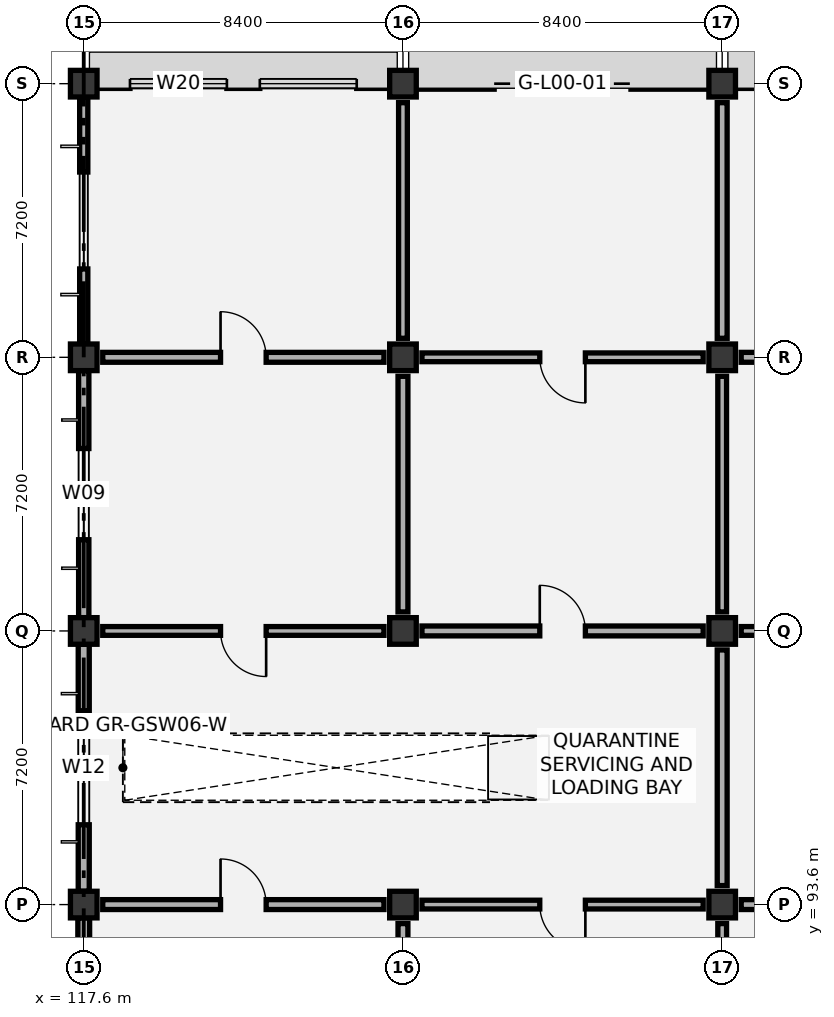
"""IFC4 building model, lengths in metres.
Left out: names, types, materials, properties, quantities, classifications, styles, units other than length and angle.
Written with IfcOpenShell. Run it as: python <this file> out.ifc"""

import sys

from ifc_helpers import new_model, si_unit, direction, frame, frame_2d, origin, origin_2d, place, context, subcontext, project, spatial, rectangle, extrude, element, fill, save


model = new_model("IFC4")
c1 = context("Model", 3, precision=1e-05, world=origin(), true_north=direction((0.0, 1.0)))
c2 = subcontext(c1, "Body", "Model", "MODEL_VIEW")
j1 = project(units=[si_unit("LENGTHUNIT", "METRE"), si_unit("PLANEANGLEUNIT", "RADIAN")], contexts=[c1])
p1 = place(None, origin())
s1 = spatial("IfcSite", under=j1, at=p1, CompositionType="ELEMENT")
p2 = place(p1, origin())
s2 = spatial("IfcBuilding", under=s1, at=p2, CompositionType="ELEMENT")
p3 = place(p2, origin())
s3 = spatial("IfcBuildingStorey", under=s2, at=p3, CompositionType="ELEMENT", Elevation=0.0)
for number, where, z_axis, x_axis in (
    (1, (117.6, 93.6, 0.0), (0.0, 0.0, 1.0), (1.0, 0.0, 0.0)),
    (2, (117.6, 100.8, 0.0), (0.0, 0.0, 1.0), (1.0, 0.0, 0.0)),
    (3, (117.6, 108.0, 0.0), (0.0, 0.0, 1.0), (1.0, 0.0, 0.0)),
    (4, (117.6, 115.2, 0.0), (0.0, 0.0, 1.0), (1.0, 0.0, 0.0)),
    (5, (126.0, 93.6, 0.0), (0.0, 0.0, 1.0), (1.0, 0.0, 0.0)),
    (6, (126.0, 100.8, 0.0), (0.0, 0.0, 1.0), (1.0, 0.0, 0.0)),
    (7, (126.0, 108.0, 0.0), (0.0, 0.0, 1.0), (1.0, 0.0, 0.0)),
    (8, (126.0, 115.2, 0.0), (0.0, 0.0, 1.0), (1.0, 0.0, 0.0)),
    (9, (134.4, 93.6, 0.0), (0.0, 0.0, 1.0), (1.0, 0.0, 0.0)),
    (10, (134.4, 100.8, 0.0), (0.0, 0.0, 1.0), (1.0, 0.0, 0.0)),
    (11, (134.4, 108.0, 0.0), (0.0, 0.0, 1.0), (1.0, 0.0, 0.0)),
    (12, (134.4, 115.2, 0.0), (0.0, 0.0, 1.0), (1.0, 0.0, 0.0)),
):
    element("IfcColumn", number, at=place(p3, frame(where, z_axis=z_axis, x_axis=x_axis)), inside=s3, PredefinedType="COLUMN", context=c2, shape_type="SweptSolid", body=[
        extrude(rectangle(XDim=0.7, YDim=0.7, at=origin_2d()), origin(), (0.0, 0.0, 1.0), 6.0),
    ])
p4 = place(p3, frame((117.6, 86.75, 0.0), z_axis=(0.0, 0.0, 1.0), x_axis=(0.0, 1.0, 0.0)))
e13 = element("IfcWall", 13, at=p4, inside=s3, PredefinedType="SOLIDWALL", context=c2, shape_type="SweptSolid", body=[
    extrude(rectangle(XDim=6.5, YDim=0.31, at=frame_2d((3.25, 0.0))), origin(), (0.0, 0.0, 1.0), 5.02),
])
p5 = place(p4, frame((1.75, 0.0, 0.9)))
e14 = element("IfcOpeningElement", 14, at=p5, cuts=e13, PredefinedType="OPENING", context=c2, shape_type="SweptSolid", body=[
    extrude(rectangle(XDim=3.0, YDim=2.1, at=frame_2d((1.5, 1.05))), frame((0.0, 0.165, 0.0), z_axis=(0.0, -1.0, 0.0), x_axis=(1.0, 0.0, 0.0)), (0.0, 0.0, 1.0), 0.33),
])
p6 = place(p3, frame((117.6, 93.95, 0.0), z_axis=(0.0, 0.0, 1.0), x_axis=(0.0, 1.0, 0.0)))
e15 = element("IfcWall", 15, at=p6, inside=s3, PredefinedType="SOLIDWALL", context=c2, shape_type="SweptSolid", body=[
    extrude(rectangle(XDim=6.5, YDim=0.29, at=frame_2d((3.25, 0.0))), origin(), (0.0, 0.0, 1.0), 5.12),
])
p7 = place(p6, frame((1.75, 0.0, 0.9)))
e16 = element("IfcOpeningElement", 16, at=p7, cuts=e15, PredefinedType="OPENING", context=c2, shape_type="SweptSolid", body=[
    extrude(rectangle(XDim=3.0, YDim=2.4, at=frame_2d((1.5, 1.2))), frame((0.0, 0.155, 0.0), z_axis=(0.0, -1.0, 0.0), x_axis=(1.0, 0.0, 0.0)), (0.0, 0.0, 1.0), 0.31),
])
p8 = place(p3, frame((117.6, 101.15, 0.0), z_axis=(0.0, 0.0, 1.0), x_axis=(0.0, 1.0, 0.0)))
e17 = element("IfcWall", 17, at=p8, inside=s3, PredefinedType="SOLIDWALL", context=c2, shape_type="SweptSolid", body=[
    extrude(rectangle(XDim=6.5, YDim=0.27, at=frame_2d((3.25, 0.0))), origin(), (0.0, 0.0, 1.0), 5.12),
])
p9 = place(p8, frame((2.05, 0.0, 0.9)))
e18 = element("IfcOpeningElement", 18, at=p9, cuts=e17, PredefinedType="OPENING", context=c2, shape_type="SweptSolid", body=[
    extrude(rectangle(XDim=2.4, YDim=2.1, at=frame_2d((1.2, 1.05))), frame((0.0, 0.145, 0.0), z_axis=(0.0, -1.0, 0.0), x_axis=(1.0, 0.0, 0.0)), (0.0, 0.0, 1.0), 0.29),
])
p10 = place(p3, frame((117.95, 115.2, 0.0), z_axis=(0.0, 0.0, 1.0), x_axis=(1.0, 0.0, 0.0)))
e19 = element("IfcWall", 19, at=p10, inside=s3, PredefinedType="SOLIDWALL", context=c2, shape_type="SweptSolid", body=[
    extrude(rectangle(XDim=7.7, YDim=0.25, at=frame_2d((3.85, 0.0))), origin(), (0.0, 0.0, 1.0), 5.12),
])
p11 = place(p10, frame((0.867, 0.0, 0.9)))
e20 = element("IfcOpeningElement", 20, at=p11, cuts=e19, PredefinedType="OPENING", context=c2, shape_type="SweptSolid", body=[
    extrude(rectangle(XDim=2.55, YDim=1.95, at=frame_2d((1.275, 0.975))), frame((0.0, 0.135, 0.0), z_axis=(0.0, -1.0, 0.0), x_axis=(1.0, 0.0, 0.0)), (0.0, 0.0, 1.0), 0.27),
])
p12 = place(p10, frame((4.283, 0.0, 0.9)))
e21 = element("IfcOpeningElement", 21, at=p12, cuts=e19, PredefinedType="OPENING", context=c2, shape_type="SweptSolid", body=[
    extrude(rectangle(XDim=2.55, YDim=1.95, at=frame_2d((1.275, 0.975))), frame((0.0, 0.135, 0.0), z_axis=(0.0, -1.0, 0.0), x_axis=(1.0, 0.0, 0.0)), (0.0, 0.0, 1.0), 0.27),
])
p13 = place(p3, frame((117.6, 108.35, 0.0), z_axis=(0.0, 0.0, 1.0), x_axis=(0.0, 1.0, 0.0)))
e22 = element("IfcWall", 22, at=p13, inside=s3, PredefinedType="SOLIDWALL", context=c2, shape_type="SweptSolid", body=[
    extrude(rectangle(XDim=6.5, YDim=0.215, at=frame_2d((3.25, 0.0))), origin(), (0.0, 0.0, 1.0), 5.12),
])
p14 = place(p13, frame((1.975, 0.0, 0.9)))
e23 = element("IfcOpeningElement", 23, at=p14, cuts=e22, PredefinedType="OPENING", context=c2, shape_type="SweptSolid", body=[
    extrude(rectangle(XDim=2.55, YDim=1.95, at=frame_2d((1.275, 0.975))), frame((0.0, 0.117, 0.0), z_axis=(0.0, -1.0, 0.0), x_axis=(1.0, 0.0, 0.0)), (0.0, 0.0, 1.0), 0.235),
])
p15 = place(p3, frame((126.35, 115.2, 0.0), z_axis=(0.0, 0.0, 1.0), x_axis=(1.0, 0.0, 0.0)))
e24 = element("IfcWall", 24, at=p15, inside=s3, PredefinedType="SOLIDWALL", context=c2, shape_type="SweptSolid", body=[
    extrude(rectangle(XDim=7.7, YDim=0.29, at=frame_2d((3.85, 0.0))), origin(), (0.0, 0.0, 1.0), 5.12),
])
p16 = place(p15, frame((2.05, 0.0, 0.0)))
e25 = element("IfcOpeningElement", 25, at=p16, cuts=e24, PredefinedType="OPENING", context=c2, shape_type="SweptSolid", body=[
    extrude(rectangle(XDim=3.6, YDim=3.6, at=frame_2d((1.8, 1.8))), frame((0.0, 0.155, 0.0), z_axis=(0.0, -1.0, 0.0), x_axis=(1.0, 0.0, 0.0)), (0.0, 0.0, 1.0), 0.31),
])
p17 = place(p3, frame((134.75, 115.2, 0.0), z_axis=(0.0, 0.0, 1.0), x_axis=(1.0, 0.0, 0.0)))
e26 = element("IfcWall", 26, at=p17, inside=s3, PredefinedType="SOLIDWALL", context=c2, shape_type="SweptSolid", body=[
    extrude(rectangle(XDim=7.7, YDim=0.25, at=frame_2d((3.85, 0.0))), origin(), (0.0, 0.0, 1.0), 5.12),
])
p18 = place(p17, frame((2.25, 0.0, 0.0)))
e27 = element("IfcOpeningElement", 27, at=p18, cuts=e26, PredefinedType="OPENING", context=c2, shape_type="SweptSolid", body=[
    extrude(rectangle(XDim=3.2, YDim=3.2, at=frame_2d((1.6, 1.6))), frame((0.0, 0.135, 0.0), z_axis=(0.0, -1.0, 0.0), x_axis=(1.0, 0.0, 0.0)), (0.0, 0.0, 1.0), 0.27),
])
p19 = place(p3, frame((126.0, 86.9, 0.0), z_axis=(0.0, 0.0, 1.0), x_axis=(0.0, 1.0, 0.0)))
e28 = element("IfcWall", 28, at=p19, inside=s3, PredefinedType="PARTITIONING", context=c2, shape_type="SweptSolid", body=[
    extrude(rectangle(XDim=6.2, YDim=0.26, at=frame_2d((3.1, 0.0))), origin(), (0.0, 0.0, 1.0), 4.92),
])
p20 = place(p3, frame((118.1, 93.6, 0.0), z_axis=(0.0, 0.0, 1.0), x_axis=(1.0, 0.0, 0.0)))
e29 = element("IfcWall", 29, at=p20, inside=s3, PredefinedType="PARTITIONING", context=c2, shape_type="SweptSolid", body=[
    extrude(rectangle(XDim=7.4, YDim=0.26, at=frame_2d((3.7, 0.0))), origin(), (0.0, 0.0, 1.0), 4.87),
])
p21 = place(p20, frame((3.1, 0.0, 0.0)))
e30 = element("IfcOpeningElement", 30, at=p21, cuts=e29, PredefinedType="OPENING", context=c2, shape_type="SweptSolid", body=[
    extrude(rectangle(XDim=1.2, YDim=2.1, at=frame_2d((0.6, 1.05))), frame((0.0, 0.14, 0.0), z_axis=(0.0, -1.0, 0.0), x_axis=(1.0, 0.0, 0.0)), (0.0, 0.0, 1.0), 0.28),
])
p22 = place(p3, frame((118.1, 100.8, 0.0), z_axis=(0.0, 0.0, 1.0), x_axis=(1.0, 0.0, 0.0)))
e31 = element("IfcWall", 31, at=p22, inside=s3, PredefinedType="PARTITIONING", context=c2, shape_type="SweptSolid", body=[
    extrude(rectangle(XDim=7.4, YDim=0.23, at=frame_2d((3.7, 0.0))), origin(), (0.0, 0.0, 1.0), 4.97),
])
p23 = place(p22, frame((3.1, 0.0, 0.0)))
e32 = element("IfcOpeningElement", 32, at=p23, cuts=e31, PredefinedType="OPENING", context=c2, shape_type="SweptSolid", body=[
    extrude(rectangle(XDim=1.2, YDim=2.1, at=frame_2d((0.6, 1.05))), frame((0.0, 0.125, 0.0), z_axis=(0.0, -1.0, 0.0), x_axis=(1.0, 0.0, 0.0)), (0.0, 0.0, 1.0), 0.25),
])
p24 = place(p3, frame((126.0, 101.3, 0.0), z_axis=(0.0, 0.0, 1.0), x_axis=(0.0, 1.0, 0.0)))
e33 = element("IfcWall", 33, at=p24, inside=s3, PredefinedType="PARTITIONING", context=c2, shape_type="SweptSolid", body=[
    extrude(rectangle(XDim=6.2, YDim=0.26, at=frame_2d((3.1, 0.0))), origin(), (0.0, 0.0, 1.0), 5.02),
])
p25 = place(p3, frame((118.1, 108.0, 0.0), z_axis=(0.0, 0.0, 1.0), x_axis=(1.0, 0.0, 0.0)))
e34 = element("IfcWall", 34, at=p25, inside=s3, PredefinedType="PARTITIONING", context=c2, shape_type="SweptSolid", body=[
    extrude(rectangle(XDim=7.4, YDim=0.26, at=frame_2d((3.7, 0.0))), origin(), (0.0, 0.0, 1.0), 4.97),
])
p26 = place(p25, frame((3.1, 0.0, 0.0)))
e35 = element("IfcOpeningElement", 35, at=p26, cuts=e34, PredefinedType="OPENING", context=c2, shape_type="SweptSolid", body=[
    extrude(rectangle(XDim=1.2, YDim=2.1, at=frame_2d((0.6, 1.05))), frame((0.0, 0.14, 0.0), z_axis=(0.0, -1.0, 0.0), x_axis=(1.0, 0.0, 0.0)), (0.0, 0.0, 1.0), 0.28),
])
p27 = place(p3, frame((126.0, 108.5, 0.0), z_axis=(0.0, 0.0, 1.0), x_axis=(0.0, 1.0, 0.0)))
e36 = element("IfcWall", 36, at=p27, inside=s3, PredefinedType="PARTITIONING", context=c2, shape_type="SweptSolid", body=[
    extrude(rectangle(XDim=6.2, YDim=0.23, at=frame_2d((3.1, 0.0))), origin(), (0.0, 0.0, 1.0), 5.37),
])
p28 = place(p3, frame((134.4, 86.9, 0.0), z_axis=(0.0, 0.0, 1.0), x_axis=(0.0, 1.0, 0.0)))
e37 = element("IfcWall", 37, at=p28, inside=s3, PredefinedType="PARTITIONING", context=c2, shape_type="SweptSolid", body=[
    extrude(rectangle(XDim=6.2, YDim=0.23, at=frame_2d((3.1, 0.0))), origin(), (0.0, 0.0, 1.0), 5.17),
])
p29 = place(p3, frame((126.5, 93.6, 0.0), z_axis=(0.0, 0.0, 1.0), x_axis=(1.0, 0.0, 0.0)))
e38 = element("IfcWall", 38, at=p29, inside=s3, PredefinedType="PARTITIONING", context=c2, shape_type="SweptSolid", body=[
    extrude(rectangle(XDim=7.4, YDim=0.23, at=frame_2d((3.7, 0.0))), origin(), (0.0, 0.0, 1.0), 4.87),
])
p30 = place(p29, frame((3.1, 0.0, 0.0)))
e39 = element("IfcOpeningElement", 39, at=p30, cuts=e38, PredefinedType="OPENING", context=c2, shape_type="SweptSolid", body=[
    extrude(rectangle(XDim=1.2, YDim=2.1, at=frame_2d((0.6, 1.05))), frame((0.0, 0.125, 0.0), z_axis=(0.0, -1.0, 0.0), x_axis=(1.0, 0.0, 0.0)), (0.0, 0.0, 1.0), 0.25),
])
p31 = place(p3, frame((134.4, 94.1, 0.0), z_axis=(0.0, 0.0, 1.0), x_axis=(0.0, 1.0, 0.0)))
e40 = element("IfcWall", 40, at=p31, inside=s3, PredefinedType="PARTITIONING", context=c2, shape_type="SweptSolid", body=[
    extrude(rectangle(XDim=6.2, YDim=0.26, at=frame_2d((3.1, 0.0))), origin(), (0.0, 0.0, 1.0), 5.02),
])
p32 = place(p3, frame((126.5, 100.8, 0.0), z_axis=(0.0, 0.0, 1.0), x_axis=(1.0, 0.0, 0.0)))
e41 = element("IfcWall", 41, at=p32, inside=s3, PredefinedType="PARTITIONING", context=c2, shape_type="SweptSolid", body=[
    extrude(rectangle(XDim=7.4, YDim=0.26, at=frame_2d((3.7, 0.0))), origin(), (0.0, 0.0, 1.0), 4.97),
])
p33 = place(p32, frame((3.1, 0.0, 0.0)))
e42 = element("IfcOpeningElement", 42, at=p33, cuts=e41, PredefinedType="OPENING", context=c2, shape_type="SweptSolid", body=[
    extrude(rectangle(XDim=1.2, YDim=2.1, at=frame_2d((0.6, 1.05))), frame((0.0, 0.14, 0.0), z_axis=(0.0, -1.0, 0.0), x_axis=(1.0, 0.0, 0.0)), (0.0, 0.0, 1.0), 0.28),
])
p34 = place(p3, frame((134.4, 101.3, 0.0), z_axis=(0.0, 0.0, 1.0), x_axis=(0.0, 1.0, 0.0)))
e43 = element("IfcWall", 43, at=p34, inside=s3, PredefinedType="PARTITIONING", context=c2, shape_type="SweptSolid", body=[
    extrude(rectangle(XDim=6.2, YDim=0.23, at=frame_2d((3.1, 0.0))), origin(), (0.0, 0.0, 1.0), 5.37),
])
p35 = place(p3, frame((126.5, 108.0, 0.0), z_axis=(0.0, 0.0, 1.0), x_axis=(1.0, 0.0, 0.0)))
e44 = element("IfcWall", 44, at=p35, inside=s3, PredefinedType="PARTITIONING", context=c2, shape_type="SweptSolid", body=[
    extrude(rectangle(XDim=7.4, YDim=0.23, at=frame_2d((3.7, 0.0))), origin(), (0.0, 0.0, 1.0), 4.97),
])
p36 = place(p35, frame((3.1, 0.0, 0.0)))
e45 = element("IfcOpeningElement", 45, at=p36, cuts=e44, PredefinedType="OPENING", context=c2, shape_type="SweptSolid", body=[
    extrude(rectangle(XDim=1.2, YDim=2.1, at=frame_2d((0.6, 1.05))), frame((0.0, 0.125, 0.0), z_axis=(0.0, -1.0, 0.0), x_axis=(1.0, 0.0, 0.0)), (0.0, 0.0, 1.0), 0.25),
])
p37 = place(p3, frame((134.4, 108.5, 0.0), z_axis=(0.0, 0.0, 1.0), x_axis=(0.0, 1.0, 0.0)))
e46 = element("IfcWall", 46, at=p37, inside=s3, PredefinedType="PARTITIONING", context=c2, shape_type="SweptSolid", body=[
    extrude(rectangle(XDim=6.2, YDim=0.26, at=frame_2d((3.1, 0.0))), origin(), (0.0, 0.0, 1.0), 5.02),
])
p38 = place(p3, frame((134.9, 93.6, 0.0), z_axis=(0.0, 0.0, 1.0), x_axis=(1.0, 0.0, 0.0)))
e47 = element("IfcWall", 47, at=p38, inside=s3, PredefinedType="PARTITIONING", context=c2, shape_type="SweptSolid", body=[
    extrude(rectangle(XDim=7.4, YDim=0.26, at=frame_2d((3.7, 0.0))), origin(), (0.0, 0.0, 1.0), 4.87),
])
p39 = place(p38, frame((3.1, 0.0, 0.0)))
e48 = element("IfcOpeningElement", 48, at=p39, cuts=e47, PredefinedType="OPENING", context=c2, shape_type="SweptSolid", body=[
    extrude(rectangle(XDim=1.2, YDim=2.1, at=frame_2d((0.6, 1.05))), frame((0.0, 0.14, 0.0), z_axis=(0.0, -1.0, 0.0), x_axis=(1.0, 0.0, 0.0)), (0.0, 0.0, 1.0), 0.28),
])
p40 = place(p3, frame((134.9, 100.8, 0.0), z_axis=(0.0, 0.0, 1.0), x_axis=(1.0, 0.0, 0.0)))
e49 = element("IfcWall", 49, at=p40, inside=s3, PredefinedType="PARTITIONING", context=c2, shape_type="SweptSolid", body=[
    extrude(rectangle(XDim=7.4, YDim=0.23, at=frame_2d((3.7, 0.0))), origin(), (0.0, 0.0, 1.0), 4.97),
])
p41 = place(p40, frame((3.1, 0.0, 0.0)))
e50 = element("IfcOpeningElement", 50, at=p41, cuts=e49, PredefinedType="OPENING", context=c2, shape_type="SweptSolid", body=[
    extrude(rectangle(XDim=1.2, YDim=2.1, at=frame_2d((0.6, 1.05))), frame((0.0, 0.125, 0.0), z_axis=(0.0, -1.0, 0.0), x_axis=(1.0, 0.0, 0.0)), (0.0, 0.0, 1.0), 0.25),
])
p42 = place(p3, frame((134.9, 108.0, 0.0), z_axis=(0.0, 0.0, 1.0), x_axis=(1.0, 0.0, 0.0)))
e51 = element("IfcWall", 51, at=p42, inside=s3, PredefinedType="PARTITIONING", context=c2, shape_type="SweptSolid", body=[
    extrude(rectangle(XDim=7.4, YDim=0.26, at=frame_2d((3.7, 0.0))), origin(), (0.0, 0.0, 1.0), 4.97),
])
p43 = place(p42, frame((3.1, 0.0, 0.0)))
e52 = element("IfcOpeningElement", 52, at=p43, cuts=e51, PredefinedType="OPENING", context=c2, shape_type="SweptSolid", body=[
    extrude(rectangle(XDim=1.2, YDim=2.1, at=frame_2d((0.6, 1.05))), frame((0.0, 0.14, 0.0), z_axis=(0.0, -1.0, 0.0), x_axis=(1.0, 0.0, 0.0)), (0.0, 0.0, 1.0), 0.28),
])
p44 = place(p7, origin())
e53 = element("IfcWindow", 53, at=p44, inside=s3, PartitioningType="SINGLE_PANEL", PredefinedType="WINDOW", context=c2, shape_type="SweptSolid", body=[
    extrude(rectangle(XDim=3.0, YDim=2.4, at=frame_2d((1.5, 1.2))), frame((0.0, 0.03, 0.0), z_axis=(0.0, -1.0, 0.0), x_axis=(1.0, 0.0, 0.0)), (0.0, 0.0, 1.0), 0.06),
])
fill(e16, e53)
p45 = place(p9, origin())
e54 = element("IfcWindow", 54, at=p45, inside=s3, PartitioningType="SINGLE_PANEL", PredefinedType="WINDOW", context=c2, shape_type="SweptSolid", body=[
    extrude(rectangle(XDim=2.4, YDim=2.1, at=frame_2d((1.2, 1.05))), frame((0.0, 0.03, 0.0), z_axis=(0.0, -1.0, 0.0), x_axis=(1.0, 0.0, 0.0)), (0.0, 0.0, 1.0), 0.06),
])
fill(e18, e54)
p46 = place(p11, origin())
e55 = element("IfcWindow", 55, at=p46, inside=s3, PartitioningType="SINGLE_PANEL", PredefinedType="WINDOW", context=c2, shape_type="SweptSolid", body=[
    extrude(rectangle(XDim=2.55, YDim=1.95, at=frame_2d((1.275, 0.975))), frame((0.0, 0.03, 0.0), z_axis=(0.0, -1.0, 0.0), x_axis=(1.0, 0.0, 0.0)), (0.0, 0.0, 1.0), 0.06),
])
fill(e20, e55)
p47 = place(p12, origin())
e56 = element("IfcWindow", 56, at=p47, inside=s3, PartitioningType="SINGLE_PANEL", PredefinedType="WINDOW", context=c2, shape_type="SweptSolid", body=[
    extrude(rectangle(XDim=2.55, YDim=1.95, at=frame_2d((1.275, 0.975))), frame((0.0, 0.03, 0.0), z_axis=(0.0, -1.0, 0.0), x_axis=(1.0, 0.0, 0.0)), (0.0, 0.0, 1.0), 0.06),
])
fill(e21, e56)
p48 = place(p14, origin())
e57 = element("IfcWindow", 57, at=p48, inside=s3, PartitioningType="SINGLE_PANEL", PredefinedType="WINDOW", context=c2, shape_type="SweptSolid", body=[
    extrude(rectangle(XDim=2.55, YDim=1.95, at=frame_2d((1.275, 0.975))), frame((0.0, 0.03, 0.0), z_axis=(0.0, -1.0, 0.0), x_axis=(1.0, 0.0, 0.0)), (0.0, 0.0, 1.0), 0.06),
])
fill(e23, e57)
p49 = place(p16, origin())
e58 = element("IfcDoor", 58, at=p49, inside=s3, OperationType="ROLLINGUP", PredefinedType="GATE", context=c2, shape_type="SweptSolid", body=[
    extrude(rectangle(XDim=3.6, YDim=3.6, at=frame_2d((1.8, 1.8))), frame((0.0, 0.025, 0.0), z_axis=(0.0, -1.0, 0.0), x_axis=(1.0, 0.0, 0.0)), (0.0, 0.0, 1.0), 0.05),
])
fill(e25, e58)
p50 = place(p21, origin())
e59 = element("IfcDoor", 59, at=p50, inside=s3, OperationType="SINGLE_SWING_LEFT", PredefinedType="DOOR", context=c2, shape_type="SweptSolid", body=[
    extrude(rectangle(XDim=1.2, YDim=2.1, at=frame_2d((0.6, 1.05))), frame((0.0, 0.025, 0.0), z_axis=(0.0, -1.0, 0.0), x_axis=(1.0, 0.0, 0.0)), (0.0, 0.0, 1.0), 0.05),
])
fill(e30, e59)
p51 = place(p23, frame((1.2, 0.0, 0.0), z_axis=(0.0, 0.0, 1.0), x_axis=(-1.0, 0.0, 0.0)))
e60 = element("IfcDoor", 60, at=p51, inside=s3, OperationType="SINGLE_SWING_LEFT", PredefinedType="DOOR", context=c2, shape_type="SweptSolid", body=[
    extrude(rectangle(XDim=1.2, YDim=2.1, at=frame_2d((0.6, 1.05))), frame((0.0, 0.025, 0.0), z_axis=(0.0, -1.0, 0.0), x_axis=(1.0, 0.0, 0.0)), (0.0, 0.0, 1.0), 0.05),
])
fill(e32, e60)
p52 = place(p26, origin())
e61 = element("IfcDoor", 61, at=p52, inside=s3, OperationType="SINGLE_SWING_LEFT", PredefinedType="DOOR", context=c2, shape_type="SweptSolid", body=[
    extrude(rectangle(XDim=1.2, YDim=2.1, at=frame_2d((0.6, 1.05))), frame((0.0, 0.025, 0.0), z_axis=(0.0, -1.0, 0.0), x_axis=(1.0, 0.0, 0.0)), (0.0, 0.0, 1.0), 0.05),
])
fill(e35, e61)
p53 = place(p30, frame((1.2, 0.0, 0.0), z_axis=(0.0, 0.0, 1.0), x_axis=(-1.0, 0.0, 0.0)))
e62 = element("IfcDoor", 62, at=p53, inside=s3, OperationType="SINGLE_SWING_LEFT", PredefinedType="DOOR", context=c2, shape_type="SweptSolid", body=[
    extrude(rectangle(XDim=1.2, YDim=2.1, at=frame_2d((0.6, 1.05))), frame((0.0, 0.025, 0.0), z_axis=(0.0, -1.0, 0.0), x_axis=(1.0, 0.0, 0.0)), (0.0, 0.0, 1.0), 0.05),
])
fill(e39, e62)
p54 = place(p33, origin())
e63 = element("IfcDoor", 63, at=p54, inside=s3, OperationType="SINGLE_SWING_LEFT", PredefinedType="DOOR", context=c2, shape_type="SweptSolid", body=[
    extrude(rectangle(XDim=1.2, YDim=2.1, at=frame_2d((0.6, 1.05))), frame((0.0, 0.025, 0.0), z_axis=(0.0, -1.0, 0.0), x_axis=(1.0, 0.0, 0.0)), (0.0, 0.0, 1.0), 0.05),
])
fill(e42, e63)
p55 = place(p36, frame((1.2, 0.0, 0.0), z_axis=(0.0, 0.0, 1.0), x_axis=(-1.0, 0.0, 0.0)))
e64 = element("IfcDoor", 64, at=p55, inside=s3, OperationType="SINGLE_SWING_LEFT", PredefinedType="DOOR", context=c2, shape_type="SweptSolid", body=[
    extrude(rectangle(XDim=1.2, YDim=2.1, at=frame_2d((0.6, 1.05))), frame((0.0, 0.025, 0.0), z_axis=(0.0, -1.0, 0.0), x_axis=(1.0, 0.0, 0.0)), (0.0, 0.0, 1.0), 0.05),
])
fill(e45, e64)
save(model, sys.argv[1])
